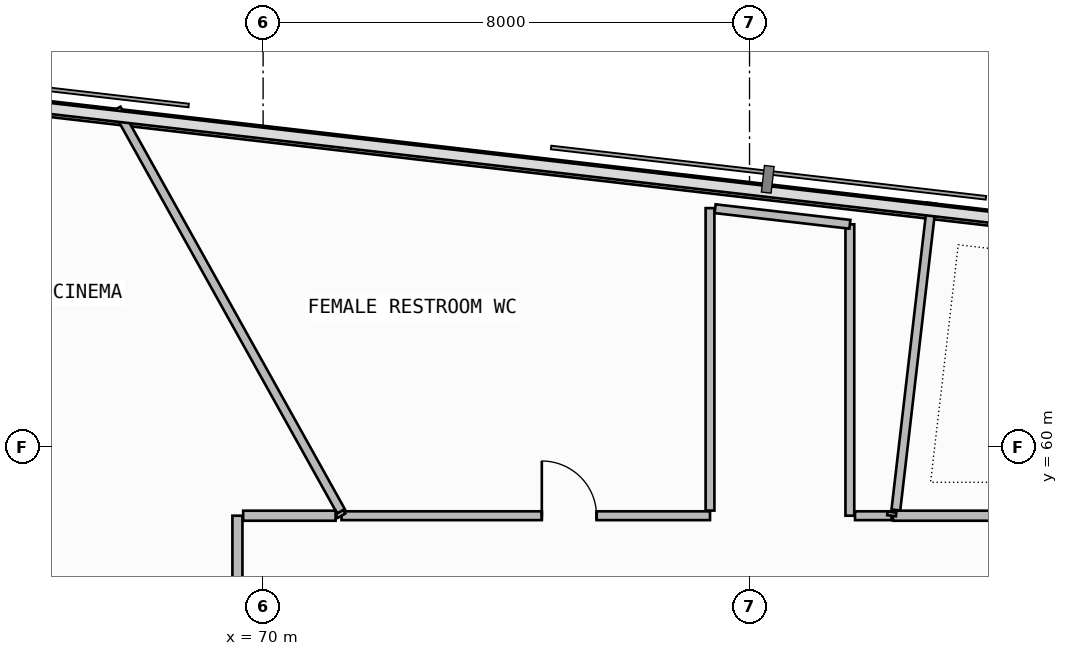
"""IFC4 building model, lengths in metres.
Left out: names, types, materials, properties, quantities, classifications, styles, units other than length and angle.
Written with IfcOpenShell. Run it as: python <this file> out.ifc"""

import sys

from ifc_helpers import new_model, si_unit, direction, frame, frame_2d, origin, place, context, subcontext, project, spatial, rectangle, extrude, element, fill, save


model = new_model("IFC4")
c1 = context("Model", 3, precision=1e-05, world=origin(), true_north=direction((0.0, 1.0)))
c2 = subcontext(c1, "Body", "Model", "MODEL_VIEW")
j1 = project(units=[si_unit("LENGTHUNIT", "METRE"), si_unit("PLANEANGLEUNIT", "RADIAN")], contexts=[c1])
p1 = place(None, origin())
s1 = spatial("IfcSite", under=j1, at=p1, CompositionType="ELEMENT")
p2 = place(p1, origin())
s2 = spatial("IfcBuilding", under=s1, at=p2, CompositionType="ELEMENT")
p3 = place(p2, frame((0.0, 0.0, 218.5)))
s3 = spatial("IfcBuildingStorey", under=s2, at=p3, CompositionType="ELEMENT", Elevation=218.5)
p4 = place(p3, frame((85.424, 63.338, 0.0), z_axis=(0.0, 0.0, 1.0), x_axis=(-0.993364714048, 0.115006716693, 0.0)))
e1 = element("IfcWall", 1, at=p4, inside=s3, PredefinedType="PARAPET", context=c2, shape_type="SweptSolid", body=[
    extrude(rectangle(XDim=26.302, YDim=0.2, at=frame_2d((13.151, 0.0))), origin(), (0.0, 0.0, 1.0), 1.15),
])
p5 = place(p3, frame((87.878, 58.872, 0.0), z_axis=(0.0, 0.0, 1.0), x_axis=(-1.0, 0.0, 0.0)))
e2 = element("IfcWall", 2, at=p5, inside=s3, PredefinedType="PARTITIONING", context=c2, shape_type="SweptSolid", body=[
    extrude(rectangle(XDim=7.518, YDim=0.165, at=frame_2d((3.759, 0.0))), origin(), (0.0, 0.0, 1.0), 2.745),
])
p6 = place(p3, frame((80.407, 58.967, 0.0), z_axis=(0.0, 0.0, 1.0), x_axis=(0.115784282811, 0.993274382965, 0.0)))
e3 = element("IfcWall", 3, at=p6, inside=s3, PredefinedType="PARTITIONING", context=c2, shape_type="SweptSolid", body=[
    extrude(rectangle(XDim=5.08, YDim=0.145, at=frame_2d((2.54, 0.0))), origin(), (0.0, 0.0, 1.0), 3.26),
])
p7 = place(p3, frame((77.35, 58.872, 0.0), z_axis=(0.0, 0.0, 1.0), x_axis=(-1.0, 0.0, 0.0)))
e4 = element("IfcWall", 4, at=p7, inside=s3, PredefinedType="PARTITIONING", context=c2, shape_type="SweptSolid", body=[
    extrude(rectangle(XDim=6.061, YDim=0.145, at=frame_2d((3.03, 0.0))), origin(), (0.0, 0.0, 1.0), 3.26),
])
p8 = place(p7, frame((1.866, 0.0, 0.0)))
e5 = element("IfcOpeningElement", 5, at=p8, cuts=e4, PredefinedType="OPENING", context=c2, shape_type="SweptSolid", body=[
    extrude(rectangle(XDim=0.9, YDim=2.1, at=frame_2d((0.45, 1.05))), frame((0.0, 0.083, 0.0), z_axis=(0.0, -1.0, 0.0), x_axis=(1.0, 0.0, 0.0)), (0.0, 0.0, 1.0), 0.165),
])
p9 = place(p3, frame((77.35, 63.931, 0.0), z_axis=(0.0, 0.0, 1.0), x_axis=(0.0, -1.0, 0.0)))
e6 = element("IfcWall", 6, at=p9, inside=s3, PredefinedType="PARTITIONING", context=c2, shape_type="SweptSolid", body=[
    extrude(rectangle(XDim=4.974, YDim=0.145, at=frame_2d((2.487, 0.0))), origin(), (0.0, 0.0, 1.0), 3.26),
])
p10 = place(p3, frame((79.65, 58.872, 0.0), z_axis=(0.0, 0.0, 1.0), x_axis=(0.0, 1.0, 0.0)))
e7 = element("IfcWall", 7, at=p10, inside=s3, PredefinedType="PARTITIONING", context=c2, shape_type="SweptSolid", body=[
    extrude(rectangle(XDim=4.792, YDim=0.145, at=frame_2d((2.396, 0.0))), origin(), (0.0, 0.0, 1.0), 3.26),
])
p11 = place(p3, frame((79.65, 63.665, 0.0), z_axis=(0.0, 0.0, 1.0), x_axis=(-0.993371485876, 0.11494821029, 0.0)))
e8 = element("IfcWall", 8, at=p11, inside=s3, PredefinedType="PARTITIONING", context=c2, shape_type="SweptSolid", body=[
    extrude(rectangle(XDim=2.23, YDim=0.145, at=frame_2d((1.115, 0.0))), origin(), (0.0, 0.0, 1.0), 3.26),
])
p12 = place(p3, frame((80.335, 58.872, 0.0), z_axis=(0.0, 0.0, 1.0), x_axis=(-1.0, 0.0, 0.0)))
e9 = element("IfcWall", 9, at=p12, inside=s3, PredefinedType="PARTITIONING", context=c2, shape_type="SweptSolid", body=[
    extrude(rectangle(XDim=0.601, YDim=0.145, at=frame_2d((0.3, 0.0))), origin(), (0.0, 0.0, 1.0), 3.26),
])
p13 = place(p3, frame((71.289, 58.872, 0.0), z_axis=(0.0, 0.0, 1.0), x_axis=(-0.493460371412, 0.869768280547, 0.0)))
e10 = element("IfcWall", 10, at=p13, inside=s3, PredefinedType="PARTITIONING", context=c2, shape_type="SweptSolid", body=[
    extrude(rectangle(XDim=0.069, YDim=0.145, at=frame_2d((0.034, 0.0))), origin(), (0.0, 0.0, 1.0), 3.26),
])
p14 = place(p3, frame((80.342, 58.932, 0.0), z_axis=(0.0, 0.0, 1.0), x_axis=(-0.117546747581, -0.99306735025, 0.0)))
e11 = element("IfcWall", 11, at=p14, inside=s3, PredefinedType="PARTITIONING", context=c2, shape_type="SweptSolid", body=[
    extrude(rectangle(XDim=0.06, YDim=0.145, at=frame_2d((0.03, 0.0))), origin(), (0.0, 0.0, 1.0), 3.26),
])
p15 = place(p3, frame((71.281, 58.946, 0.0), z_axis=(0.0, 0.0, 1.0), x_axis=(-0.486925562198, 0.873443470912, 0.0)))
e12 = element("IfcWall", 12, at=p15, inside=s3, PredefinedType="PARTITIONING", context=c2, shape_type="SweptSolid", body=[
    extrude(rectangle(XDim=7.576, YDim=0.145, at=frame_2d((3.788, 0.0))), origin(), (0.0, 0.0, 1.0), 3.26),
])
p16 = place(p3, frame((56.37, 66.863, 0.0), z_axis=(0.0, 0.0, 1.0), x_axis=(0.723906361949, -0.689898238243, 0.0)))
e13 = element("IfcWall", 13, at=p16, inside=s3, PredefinedType="PARTITIONING", context=c2, shape_type="SweptSolid", body=[
    extrude(rectangle(XDim=18.206, YDim=0.125, at=frame_2d((9.103, 0.0))), origin(), (0.0, 0.0, 1.0), 2.645),
])
p17 = place(p3, frame((69.578, 58.872, 0.0), z_axis=(0.0, 0.0, 1.0), x_axis=(0.0, -1.0, 0.0)))
e14 = element("IfcWall", 14, at=p17, inside=s3, PredefinedType="PARTITIONING", context=c2, shape_type="SweptSolid", body=[
    extrude(rectangle(XDim=4.493, YDim=0.165, at=frame_2d((2.247, 0.0))), origin(), (0.0, 0.0, 1.0), 2.745),
])
p18 = place(p17, frame((1.282, 0.0, 0.0)))
e15 = element("IfcOpeningElement", 15, at=p18, cuts=e14, PredefinedType="OPENING", context=c2, shape_type="SweptSolid", body=[
    extrude(rectangle(XDim=1.0, YDim=2.2, at=frame_2d((0.5, 1.1))), frame((0.0, 0.093, 0.0), z_axis=(0.0, -1.0, 0.0), x_axis=(1.0, 0.0, 0.0)), (0.0, 0.0, 1.0), 0.185),
])
p19 = place(p3, frame((71.192, 58.872, 0.0), z_axis=(0.0, 0.0, 1.0), x_axis=(-1.0, 0.0, 0.0)))
e16 = element("IfcWall", 16, at=p19, inside=s3, PredefinedType="PARTITIONING", context=c2, shape_type="SweptSolid", body=[
    extrude(rectangle(XDim=1.52, YDim=0.165, at=frame_2d((0.76, 0.0))), origin(), (0.0, 0.0, 1.0), 3.26),
])
p20 = place(p8, frame((0.9, 0.0, 0.0), z_axis=(0.0, 0.0, 1.0), x_axis=(-1.0, 0.0, 0.0)))
e17 = element("IfcDoor", 17, at=p20, inside=s3, OperationType="SINGLE_SWING_LEFT", PredefinedType="DOOR", context=c2, shape_type="SweptSolid", body=[
    extrude(rectangle(XDim=0.9, YDim=2.1, at=frame_2d((0.45, 1.05))), frame((0.0, 0.025, 0.0), z_axis=(0.0, -1.0, 0.0), x_axis=(1.0, 0.0, 0.0)), (0.0, 0.0, 1.0), 0.05),
])
fill(e5, e17)
save(model, sys.argv[1])
